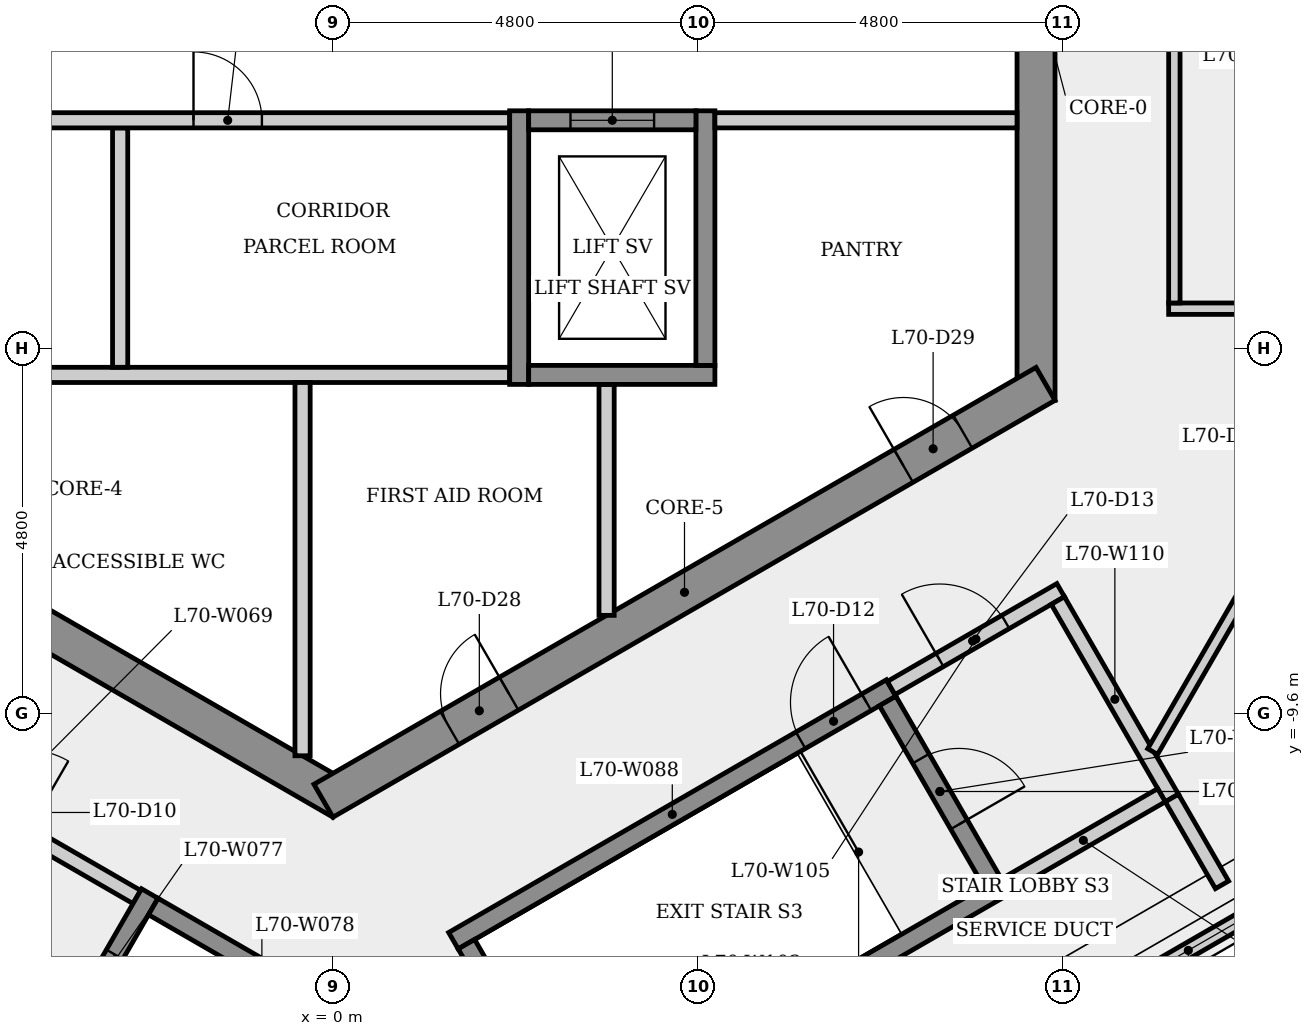
"""IFC4 building model, lengths in metres.
Left out: names, types, materials, properties, quantities, classifications, styles, units other than length and angle.
Written with IfcOpenShell. Run it as: python <this file> out.ifc"""

import sys

from ifc_helpers import new_model, si_unit, direction, frame, frame_2d, origin, place, context, subcontext, project, spatial, rectangle, extrude, element, fill, save


model = new_model("IFC4")
c1 = context("Model", 3, precision=1e-05, world=origin(), true_north=direction((0.0, 1.0)))
c2 = subcontext(c1, "Body", "Model", "MODEL_VIEW")
j1 = project(units=[si_unit("LENGTHUNIT", "METRE"), si_unit("PLANEANGLEUNIT", "RADIAN")], contexts=[c1])
p1 = place(None, origin())
s1 = spatial("IfcSite", under=j1, at=p1, CompositionType="ELEMENT")
p2 = place(p1, origin())
s2 = spatial("IfcBuilding", under=s1, at=p2, CompositionType="ELEMENT")
p3 = place(p2, frame((0.0, 0.0, 262.9)))
s3 = spatial("IfcBuildingStorey", under=s2, at=p3, CompositionType="ELEMENT", Elevation=262.9)
p4 = place(p3, frame((9.25, -5.485, 0.0), z_axis=(0.0, 0.0, 1.0), x_axis=(0.0, 1.0, 0.0)))
e1 = element("IfcWall", 1, at=p4, inside=s3, PredefinedType="SHEAR", context=c2, shape_type="SweptSolid", body=[
    extrude(rectangle(XDim=10.97, YDim=0.5, at=frame_2d((5.485, 0.0))), origin(), (0.0, 0.0, 1.0), 4.8),
])
p5 = place(p4, frame((4.685, 0.0, 0.0)))
e2 = element("IfcOpeningElement", 2, at=p5, cuts=e1, PredefinedType="OPENING", context=c2, shape_type="SweptSolid", body=[
    extrude(rectangle(XDim=1.6, YDim=2.1, at=frame_2d((0.8, 1.05))), frame((0.0, 0.26, 0.0), z_axis=(0.0, -1.0, 0.0), x_axis=(1.0, 0.0, 0.0)), (0.0, 0.0, 1.0), 0.52),
])
p6 = place(p3, frame((-9.375, -5.268, 0.0), z_axis=(0.0, 0.0, 1.0), x_axis=(0.866023993627, -0.500002442456, 0.0)))
e3 = element("IfcWall", 3, at=p6, inside=s3, PredefinedType="SHEAR", context=c2, shape_type="SweptSolid", body=[
    extrude(rectangle(XDim=10.97, YDim=0.5, at=frame_2d((5.485, 0.0))), origin(), (0.0, 0.0, 1.0), 4.8),
])
p7 = place(p6, frame((4.804, 0.0, 0.0)))
e4 = element("IfcOpeningElement", 4, at=p7, cuts=e3, PredefinedType="OPENING", context=c2, shape_type="SweptSolid", body=[
    extrude(rectangle(XDim=0.9, YDim=2.1, at=frame_2d((0.45, 1.05))), frame((0.0, 0.26, 0.0), z_axis=(0.0, -1.0, 0.0), x_axis=(1.0, 0.0, 0.0)), (0.0, 0.0, 1.0), 0.52),
])
p8 = place(p3, frame((-0.125, -10.753, 0.0), z_axis=(0.0, 0.0, 1.0), x_axis=(0.866023993627, 0.500002442456, 0.0)))
e5 = element("IfcWall", 5, at=p8, inside=s3, PredefinedType="SHEAR", context=c2, shape_type="SweptSolid", body=[
    extrude(rectangle(XDim=10.97, YDim=0.5, at=frame_2d((5.485, 0.0))), origin(), (0.0, 0.0, 1.0), 4.8),
])
p9 = place(p8, frame((1.918, 0.0, 0.0)))
e6 = element("IfcOpeningElement", 6, at=p9, cuts=e5, PredefinedType="OPENING", context=c2, shape_type="SweptSolid", body=[
    extrude(rectangle(XDim=0.9, YDim=2.1, at=frame_2d((0.45, 1.05))), frame((0.0, 0.26, 0.0), z_axis=(0.0, -1.0, 0.0), x_axis=(1.0, 0.0, 0.0)), (0.0, 0.0, 1.0), 0.52),
])
p10 = place(p8, frame((8.812, 0.0, 0.0)))
e7 = element("IfcOpeningElement", 7, at=p10, cuts=e5, PredefinedType="OPENING", context=c2, shape_type="SweptSolid", body=[
    extrude(rectangle(XDim=0.9, YDim=2.1, at=frame_2d((0.45, 1.05))), frame((0.0, 0.26, 0.0), z_axis=(0.0, -1.0, 0.0), x_axis=(1.0, 0.0, 0.0)), (0.0, 0.0, 1.0), 0.52),
])
p11 = place(p3, frame((9.788, -13.568, 0.0), z_axis=(0.0, 0.0, 1.0), x_axis=(0.865992138996, 0.500057611879, 0.0)))
e8 = element("IfcWall", 8, at=p11, inside=s3, PredefinedType="SOLIDWALL", context=c2, shape_type="SweptSolid", body=[
    extrude(rectangle(XDim=3.384, YDim=0.2, at=frame_2d((1.692, 0.0))), origin(), (0.0, 0.0, 1.0), 4.8),
])
p12 = place(p11, frame((0.492, 0.0, 0.8)))
e9 = element("IfcOpeningElement", 9, at=p12, cuts=e8, PredefinedType="OPENING", context=c2, shape_type="SweptSolid", body=[
    extrude(rectangle(XDim=2.4, YDim=2.4, at=frame_2d((1.2, 1.2))), frame((0.0, 0.11, 0.0), z_axis=(0.0, -1.0, 0.0), x_axis=(1.0, 0.0, 0.0)), (0.0, 0.0, 1.0), 0.22),
])
p13 = place(p3, frame((-9.0, -5.15, 0.0), z_axis=(0.0, 0.0, 1.0), x_axis=(1.0, 0.0, 0.0)))
e10 = element("IfcWall", 10, at=p13, inside=s3, PredefinedType="PARTITIONING", context=c2, shape_type="SweptSolid", body=[
    extrude(rectangle(XDim=11.325, YDim=0.2, at=frame_2d((5.663, 0.0))), origin(), (0.0, 0.0, 1.0), 4.5),
])
p14 = place(p3, frame((-6.435, -9.795, 0.0), z_axis=(0.0, 0.0, 1.0), x_axis=(0.866012907634, -0.500021643343, 0.0)))
e11 = element("IfcWall", 11, at=p14, inside=s3, PredefinedType="PARTITIONING", context=c2, shape_type="SweptSolid", body=[
    extrude(rectangle(XDim=4.45, YDim=0.2, at=frame_2d((2.225, 0.0))), origin(), (0.0, 0.0, 1.0), 4.5),
])
p15 = place(p14, frame((1.675, 0.0, 0.0)))
e12 = element("IfcOpeningElement", 12, at=p15, cuts=e11, PredefinedType="OPENING", context=c2, shape_type="SweptSolid", body=[
    extrude(rectangle(XDim=1.1, YDim=2.1, at=frame_2d((0.55, 1.05))), frame((0.0, 0.11, 0.0), z_axis=(0.0, -1.0, 0.0), x_axis=(1.0, 0.0, 0.0)), (0.0, 0.0, 1.0), 0.22),
])
p16 = place(p3, frame((-2.8, -1.9, 0.0), z_axis=(0.0, 0.0, 1.0), x_axis=(0.0, -1.0, 0.0)))
e13 = element("IfcWall", 13, at=p16, inside=s3, PredefinedType="PARTITIONING", context=c2, shape_type="SweptSolid", body=[
    extrude(rectangle(XDim=3.15, YDim=0.2, at=frame_2d((1.575, 0.0))), origin(), (0.0, 0.0, 1.0), 4.5),
])
p17 = place(p3, frame((-9.0, -1.8, 0.0), z_axis=(0.0, 0.0, 1.0), x_axis=(1.0, 0.0, 0.0)))
e14 = element("IfcWall", 14, at=p17, inside=s3, PredefinedType="PARTITIONING", context=c2, shape_type="SweptSolid", body=[
    extrude(rectangle(XDim=11.325, YDim=0.2, at=frame_2d((5.663, 0.0))), origin(), (0.0, 0.0, 1.0), 4.5),
])
p18 = place(p17, frame((2.635, 0.0, 0.0)))
e15 = element("IfcOpeningElement", 15, at=p18, cuts=e14, PredefinedType="OPENING", context=c2, shape_type="SweptSolid", body=[
    extrude(rectangle(XDim=0.9, YDim=2.1, at=frame_2d((0.45, 1.05))), frame((0.0, 0.11, 0.0), z_axis=(0.0, -1.0, 0.0), x_axis=(1.0, 0.0, 0.0)), (0.0, 0.0, 1.0), 0.22),
])
p19 = place(p17, frame((7.165, 0.0, 0.0)))
e16 = element("IfcOpeningElement", 16, at=p19, cuts=e14, PredefinedType="OPENING", context=c2, shape_type="SweptSolid", body=[
    extrude(rectangle(XDim=0.9, YDim=2.1, at=frame_2d((0.45, 1.05))), frame((0.0, 0.11, 0.0), z_axis=(0.0, -1.0, 0.0), x_axis=(1.0, 0.0, 0.0)), (0.0, 0.0, 1.0), 0.22),
])
p20 = place(p3, frame((-2.41, -11.974, 0.0), z_axis=(0.0, 0.0, 1.0), x_axis=(-0.500001826776, -0.866024349092, 0.0)))
e17 = element("IfcWall", 17, at=p20, inside=s3, PredefinedType="SHEAR", context=c2, shape_type="SweptSolid", body=[
    extrude(rectangle(XDim=2.95, YDim=0.25, at=frame_2d((1.475, 0.0))), origin(), (0.0, 0.0, 1.0), 4.5),
])
p21 = place(p20, frame((0.925, 0.0, 0.0)))
e18 = element("IfcOpeningElement", 18, at=p21, cuts=e17, PredefinedType="OPENING", context=c2, shape_type="SweptSolid", body=[
    extrude(rectangle(XDim=1.1, YDim=2.1, at=frame_2d((0.55, 1.05))), frame((0.0, 0.135, 0.0), z_axis=(0.0, -1.0, 0.0), x_axis=(1.0, 0.0, 0.0)), (0.0, 0.0, 1.0), 0.27),
])
p22 = place(p3, frame((-2.364, -12.145, 0.0), z_axis=(0.0, 0.0, 1.0), x_axis=(0.866040211805, -0.499974350878, 0.0)))
e19 = element("IfcWall", 19, at=p22, inside=s3, PredefinedType="SHEAR", context=c2, shape_type="SweptSolid", body=[
    extrude(rectangle(XDim=3.3, YDim=0.25, at=frame_2d((1.65, 0.0))), origin(), (0.0, 0.0, 1.0), 4.5),
])
p23 = place(p3, frame((-0.4, -5.25, 0.0), z_axis=(0.0, 0.0, 1.0), x_axis=(0.0, -1.0, 0.0)))
e20 = element("IfcWall", 20, at=p23, inside=s3, PredefinedType="PARTITIONING", context=c2, shape_type="SweptSolid", body=[
    extrude(rectangle(XDim=4.911, YDim=0.2, at=frame_2d((2.456, 0.0))), origin(), (0.0, 0.0, 1.0), 4.5),
])
p24 = place(p3, frame((1.585, -12.595, 0.0), z_axis=(0.0, 0.0, 1.0), x_axis=(0.866036417653, 0.499980922934, 0.0)))
e21 = element("IfcWall", 21, at=p24, inside=s3, PredefinedType="SHEAR", context=c2, shape_type="SweptSolid", body=[
    extrude(rectangle(XDim=6.65, YDim=0.25, at=frame_2d((3.325, 0.0))), origin(), (0.0, 0.0, 1.0), 4.5),
])
p25 = place(p24, frame((5.275, 0.0, 0.0)))
e22 = element("IfcOpeningElement", 22, at=p25, cuts=e21, PredefinedType="OPENING", context=c2, shape_type="SweptSolid", body=[
    extrude(rectangle(XDim=1.0, YDim=2.1, at=frame_2d((0.5, 1.05))), frame((0.0, 0.135, 0.0), z_axis=(0.0, -1.0, 0.0), x_axis=(1.0, 0.0, 0.0)), (0.0, 0.0, 1.0), 0.27),
])
p26 = place(p3, frame((2.45, -5.275, 0.0), z_axis=(0.0, 0.0, 1.0), x_axis=(0.0, 1.0, 0.0)))
e23 = element("IfcWall", 23, at=p26, inside=s3, PredefinedType="SHEAR", context=c2, shape_type="SweptSolid", body=[
    extrude(rectangle(XDim=3.6, YDim=0.25, at=frame_2d((1.8, 0.0))), origin(), (0.0, 0.0, 1.0), 4.5),
])
p27 = place(p3, frame((3.256, -15.239, 0.0), z_axis=(0.0, 0.0, 1.0), x_axis=(-0.50002537861, 0.866010750942, 0.0)))
e24 = element("IfcWall", 24, at=p27, inside=s3, PredefinedType="SHEAR", context=c2, shape_type="SweptSolid", body=[
    extrude(rectangle(XDim=3.0, YDim=0.25, at=frame_2d((1.5, 0.0))), origin(), (0.0, 0.0, 1.0), 4.5),
])
p28 = place(p3, frame((3.6, -5.275, 0.0), z_axis=(0.0, 0.0, 1.0), x_axis=(0.0, -1.0, 0.0)))
e25 = element("IfcWall", 25, at=p28, inside=s3, PredefinedType="PARTITIONING", context=c2, shape_type="SweptSolid", body=[
    extrude(rectangle(XDim=3.039, YDim=0.2, at=frame_2d((1.52, 0.0))), origin(), (0.0, 0.0, 1.0), 4.5),
])
p29 = place(p3, frame((2.575, -5.15, 0.0), z_axis=(0.0, 0.0, 1.0), x_axis=(1.0, 0.0, 0.0)))
e26 = element("IfcWall", 26, at=p29, inside=s3, PredefinedType="SHEAR", context=c2, shape_type="SweptSolid", body=[
    extrude(rectangle(XDim=2.45, YDim=0.25, at=frame_2d((1.225, 0.0))), origin(), (0.0, 0.0, 1.0), 4.5),
])
p30 = place(p3, frame((4.9, -1.675, 0.0), z_axis=(0.0, 0.0, 1.0), x_axis=(0.0, -1.0, 0.0)))
e27 = element("IfcWall", 27, at=p30, inside=s3, PredefinedType="SHEAR", context=c2, shape_type="SweptSolid", body=[
    extrude(rectangle(XDim=3.35, YDim=0.25, at=frame_2d((1.675, 0.0))), origin(), (0.0, 0.0, 1.0), 4.5),
])
p31 = place(p3, frame((4.775, -1.8, 0.0), z_axis=(0.0, 0.0, 1.0), x_axis=(-1.0, 0.0, 0.0)))
e28 = element("IfcWall", 28, at=p31, inside=s3, PredefinedType="SHEAR", context=c2, shape_type="SweptSolid", body=[
    extrude(rectangle(XDim=2.2, YDim=0.25, at=frame_2d((1.1, 0.0))), origin(), (0.0, 0.0, 1.0), 4.5),
])
p32 = place(p31, frame((0.55, 0.0, 0.0)))
e29 = element("IfcOpeningElement", 29, at=p32, cuts=e28, PredefinedType="OPENING", context=c2, shape_type="SweptSolid", body=[
    extrude(rectangle(XDim=1.1, YDim=2.1, at=frame_2d((0.55, 1.05))), frame((0.0, 0.135, 0.0), z_axis=(0.0, -1.0, 0.0), x_axis=(1.0, 0.0, 0.0)), (0.0, 0.0, 1.0), 0.27),
])
p33 = place(p3, frame((3.301, -15.068, 0.0), z_axis=(0.0, 0.0, 1.0), x_axis=(0.866035036182, 0.499983315828, 0.0)))
e30 = element("IfcWall", 30, at=p33, inside=s3, PredefinedType="SHEAR", context=c2, shape_type="SweptSolid", body=[
    extrude(rectangle(XDim=6.4, YDim=0.25, at=frame_2d((3.2, 0.0))), origin(), (0.0, 0.0, 1.0), 4.5),
])
p34 = place(p3, frame((7.298, -9.441, 0.0), z_axis=(0.0, 0.0, 1.0), x_axis=(0.500034990121, -0.866005201286, 0.0)))
e31 = element("IfcWall", 31, at=p34, inside=s3, PredefinedType="SHEAR", context=c2, shape_type="SweptSolid", body=[
    extrude(rectangle(XDim=2.75, YDim=0.25, at=frame_2d((1.375, 0.0))), origin(), (0.0, 0.0, 1.0), 4.5),
])
p35 = place(p34, frame((0.875, 0.0, 0.0)))
e32 = element("IfcOpeningElement", 32, at=p35, cuts=e31, PredefinedType="OPENING", context=c2, shape_type="SweptSolid", body=[
    extrude(rectangle(XDim=1.0, YDim=2.1, at=frame_2d((0.5, 1.05))), frame((0.0, 0.135, 0.0), z_axis=(0.0, -1.0, 0.0), x_axis=(1.0, 0.0, 0.0)), (0.0, 0.0, 1.0), 0.27),
])
p36 = place(p3, frame((7.344, -9.27, 0.0), z_axis=(0.0, 0.0, 1.0), x_axis=(0.866005588531, 0.500034319456, 0.0)))
e33 = element("IfcWall", 33, at=p36, inside=s3, PredefinedType="PARTITIONING", context=c2, shape_type="SweptSolid", body=[
    extrude(rectangle(XDim=2.575, YDim=0.2, at=frame_2d((1.288, 0.0))), origin(), (0.0, 0.0, 1.0), 4.5),
])
p37 = place(p36, frame((0.738, 0.0, 0.0)))
e34 = element("IfcOpeningElement", 34, at=p37, cuts=e33, PredefinedType="OPENING", context=c2, shape_type="SweptSolid", body=[
    extrude(rectangle(XDim=1.0, YDim=2.1, at=frame_2d((0.5, 1.05))), frame((0.0, 0.11, 0.0), z_axis=(0.0, -1.0, 0.0), x_axis=(1.0, 0.0, 0.0)), (0.0, 0.0, 1.0), 0.22),
])
p38 = place(p3, frame((9.0, -1.8, 0.0), z_axis=(0.0, 0.0, 1.0), x_axis=(-1.0, 0.0, 0.0)))
e35 = element("IfcWall", 35, at=p38, inside=s3, PredefinedType="PARTITIONING", context=c2, shape_type="SweptSolid", body=[
    extrude(rectangle(XDim=3.975, YDim=0.2, at=frame_2d((1.988, 0.0))), origin(), (0.0, 0.0, 1.0), 4.5),
])
p39 = place(p3, frame((9.537, -8.119, 0.0), z_axis=(0.0, 0.0, 1.0), x_axis=(0.499990139034, -0.866031096941, 0.0)))
e36 = element("IfcWall", 36, at=p39, inside=s3, PredefinedType="PARTITIONING", context=c2, shape_type="SweptSolid", body=[
    extrude(rectangle(XDim=3.0, YDim=0.2, at=frame_2d((1.5, 0.0))), origin(), (0.0, 0.0, 1.0), 4.5),
])
p40 = place(p3, frame((10.901, -10.681, 0.0), z_axis=(0.0, 0.0, 1.0), x_axis=(-0.866007538022, -0.500030943131, 0.0)))
e37 = element("IfcWall", 37, at=p40, inside=s3, PredefinedType="PLUMBINGWALL", context=c2, shape_type="SweptSolid", body=[
    extrude(rectangle(XDim=2.375, YDim=0.2, at=frame_2d((1.188, 0.0))), origin(), (0.0, 0.0, 1.0), 4.5),
])
p41 = place(p3, frame((11.037, -10.717, 0.0), z_axis=(0.0, 0.0, 1.0), x_axis=(0.500000102728, -0.866025344474, 0.0)))
e38 = element("IfcWall", 38, at=p41, inside=s3, PredefinedType="PLUMBINGWALL", context=c2, shape_type="SweptSolid", body=[
    extrude(rectangle(XDim=1.319, YDim=0.2, at=frame_2d((0.66, 0.0))), origin(), (0.0, 0.0, 1.0), 4.5),
])
p42 = place(p3, frame((10.995, -4.279, 0.0), z_axis=(0.0, 0.0, 1.0), x_axis=(1.0, 0.0, 0.0)))
e39 = element("IfcWall", 39, at=p42, inside=s3, PredefinedType="PARTITIONING", context=c2, shape_type="SweptSolid", body=[
    extrude(rectangle(XDim=3.229, YDim=0.15, at=frame_2d((1.614, 0.0))), origin(), (0.0, 0.0, 1.0), 4.5),
])
p43 = place(p3, frame((11.07, 4.354, 0.0), z_axis=(0.0, 0.0, 1.0), x_axis=(0.0, -1.0, 0.0)))
e40 = element("IfcWall", 40, at=p43, inside=s3, PredefinedType="PARTITIONING", context=c2, shape_type="SweptSolid", body=[
    extrude(rectangle(XDim=8.557, YDim=0.15, at=frame_2d((4.279, 0.0))), origin(), (0.0, 0.0, 1.0), 4.5),
])
p44 = place(p43, frame((2.426, 0.0, 0.0)))
e41 = element("IfcOpeningElement", 41, at=p44, cuts=e40, PredefinedType="OPENING", context=c2, shape_type="SweptSolid", body=[
    extrude(rectangle(XDim=1.0, YDim=2.1, at=frame_2d((0.5, 1.05))), frame((0.0, 0.085, 0.0), z_axis=(0.0, -1.0, 0.0), x_axis=(1.0, 0.0, 0.0)), (0.0, 0.0, 1.0), 0.17),
])
p45 = place(p3, frame((14.111, -4.344, 0.0), z_axis=(0.0, 0.0, 1.0), x_axis=(-0.499967020646, -0.866044443586, 0.0)))
e42 = element("IfcWall", 42, at=p45, inside=s3, PredefinedType="PARTITIONING", context=c2, shape_type="SweptSolid", body=[
    extrude(rectangle(XDim=6.654, YDim=0.15, at=frame_2d((3.327, 0.0))), origin(), (0.0, 0.0, 1.0), 4.5),
])
p46 = place(p45, frame((2.827, 0.0, 0.0)))
e43 = element("IfcOpeningElement", 43, at=p46, cuts=e42, PredefinedType="OPENING", context=c2, shape_type="SweptSolid", body=[
    extrude(rectangle(XDim=1.0, YDim=2.1, at=frame_2d((0.5, 1.05))), frame((0.0, 0.085, 0.0), z_axis=(0.0, -1.0, 0.0), x_axis=(1.0, 0.0, 0.0)), (0.0, 0.0, 1.0), 0.17),
])
p47 = place(p12, origin())
e44 = element("IfcWindow", 44, at=p47, inside=s3, PartitioningType="SINGLE_PANEL", PredefinedType="WINDOW", context=c2, shape_type="SweptSolid", body=[
    extrude(rectangle(XDim=2.4, YDim=2.4, at=frame_2d((1.2, 1.2))), frame((0.0, 0.03, 0.0), z_axis=(0.0, -1.0, 0.0), x_axis=(1.0, 0.0, 0.0)), (0.0, 0.0, 1.0), 0.06),
])
fill(e9, e44)
p48 = place(p32, origin())
e45 = element("IfcDoor", 45, at=p48, inside=s3, OperationType="SLIDING_TO_LEFT", PredefinedType="DOOR", context=c2, shape_type="SweptSolid", body=[
    extrude(rectangle(XDim=1.1, YDim=2.1, at=frame_2d((0.55, 1.05))), frame((0.0, 0.025, 0.0), z_axis=(0.0, -1.0, 0.0), x_axis=(1.0, 0.0, 0.0)), (0.0, 0.0, 1.0), 0.05),
])
fill(e29, e45)
p49 = place(p19, origin())
e46 = element("IfcDoor", 46, at=p49, inside=s3, OperationType="SINGLE_SWING_LEFT", PredefinedType="DOOR", context=c2, shape_type="SweptSolid", body=[
    extrude(rectangle(XDim=0.9, YDim=2.1, at=frame_2d((0.45, 1.05))), frame((0.0, 0.025, 0.0), z_axis=(0.0, -1.0, 0.0), x_axis=(1.0, 0.0, 0.0)), (0.0, 0.0, 1.0), 0.05),
])
fill(e16, e46)
p50 = place(p21, origin())
e47 = element("IfcDoor", 47, at=p50, inside=s3, OperationType="SLIDING_TO_LEFT", PredefinedType="DOOR", context=c2, shape_type="SweptSolid", body=[
    extrude(rectangle(XDim=1.1, YDim=2.1, at=frame_2d((0.55, 1.05))), frame((0.0, 0.025, 0.0), z_axis=(0.0, -1.0, 0.0), x_axis=(1.0, 0.0, 0.0)), (0.0, 0.0, 1.0), 0.05),
])
fill(e18, e47)
p51 = place(p25, origin())
e48 = element("IfcDoor", 48, at=p51, inside=s3, OperationType="SINGLE_SWING_RIGHT", PredefinedType="DOOR", context=c2, shape_type="SweptSolid", body=[
    extrude(rectangle(XDim=1.0, YDim=2.1, at=frame_2d((0.5, 1.05))), frame((0.0, 0.025, 0.0), z_axis=(0.0, -1.0, 0.0), x_axis=(1.0, 0.0, 0.0)), (0.0, 0.0, 1.0), 0.05),
])
fill(e22, e48)
p52 = place(p37, origin())
e49 = element("IfcDoor", 49, at=p52, inside=s3, OperationType="SINGLE_SWING_LEFT", PredefinedType="DOOR", context=c2, shape_type="SweptSolid", body=[
    extrude(rectangle(XDim=1.0, YDim=2.1, at=frame_2d((0.5, 1.05))), frame((0.0, 0.025, 0.0), z_axis=(0.0, -1.0, 0.0), x_axis=(1.0, 0.0, 0.0)), (0.0, 0.0, 1.0), 0.05),
])
fill(e34, e49)
p53 = place(p35, origin())
e50 = element("IfcDoor", 50, at=p53, inside=s3, OperationType="SINGLE_SWING_RIGHT", PredefinedType="DOOR", context=c2, shape_type="SweptSolid", body=[
    extrude(rectangle(XDim=1.0, YDim=2.1, at=frame_2d((0.5, 1.05))), frame((0.0, 0.025, 0.0), z_axis=(0.0, -1.0, 0.0), x_axis=(1.0, 0.0, 0.0)), (0.0, 0.0, 1.0), 0.05),
])
fill(e32, e50)
p54 = place(p9, origin())
e51 = element("IfcDoor", 51, at=p54, inside=s3, OperationType="SINGLE_SWING_RIGHT", PredefinedType="DOOR", context=c2, shape_type="SweptSolid", body=[
    extrude(rectangle(XDim=0.9, YDim=2.1, at=frame_2d((0.45, 1.05))), frame((0.0, 0.025, 0.0), z_axis=(0.0, -1.0, 0.0), x_axis=(1.0, 0.0, 0.0)), (0.0, 0.0, 1.0), 0.05),
])
fill(e6, e51)
p55 = place(p10, origin())
e52 = element("IfcDoor", 52, at=p55, inside=s3, OperationType="SINGLE_SWING_LEFT", PredefinedType="DOOR", context=c2, shape_type="SweptSolid", body=[
    extrude(rectangle(XDim=0.9, YDim=2.1, at=frame_2d((0.45, 1.05))), frame((0.0, 0.025, 0.0), z_axis=(0.0, -1.0, 0.0), x_axis=(1.0, 0.0, 0.0)), (0.0, 0.0, 1.0), 0.05),
])
fill(e7, e52)
save(model, sys.argv[1])
